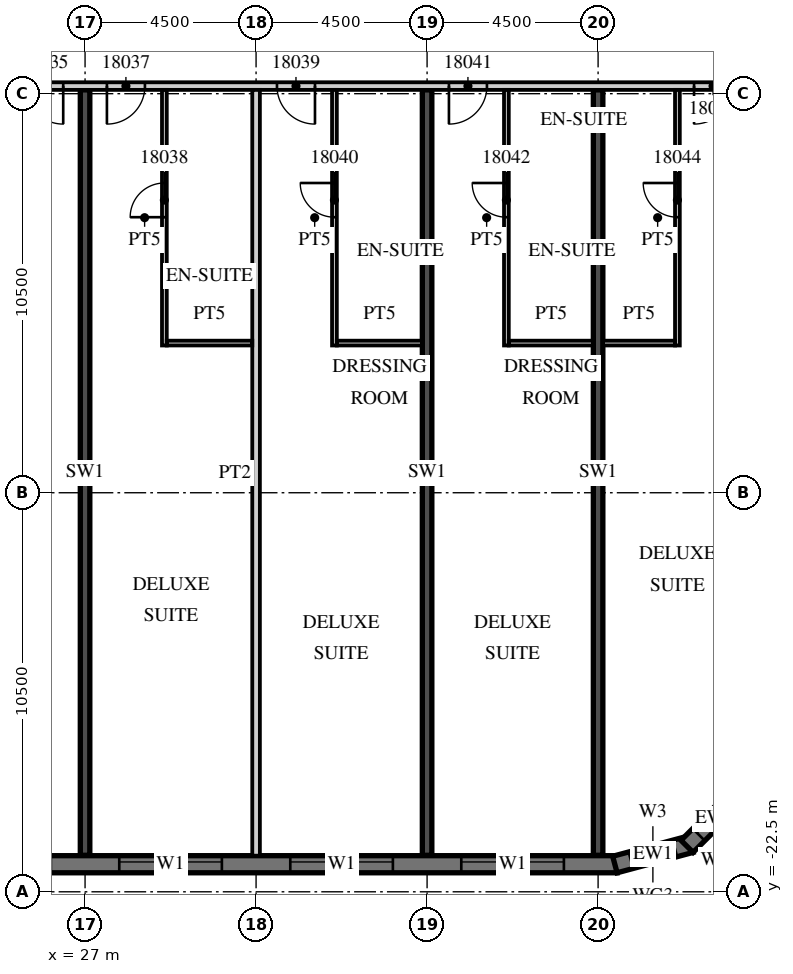
"""IFC4 building model, lengths in metres.
Left out: names, types, materials, properties, quantities, classifications, styles, units other than length and angle.
Written with IfcOpenShell. Run it as: python <this file> out.ifc"""

import sys

from ifc_helpers import new_model, si_unit, direction, frame, frame_2d, origin, place, context, subcontext, project, spatial, polyline, rectangle, outline, extrude, element, fill, save


model = new_model("IFC4")
c1 = context("Model", 3, precision=1e-05, world=origin(), true_north=direction((0.0, 1.0)))
c2 = subcontext(c1, "Body", "Model", "MODEL_VIEW")
j1 = project(units=[si_unit("LENGTHUNIT", "METRE"), si_unit("PLANEANGLEUNIT", "RADIAN")], contexts=[c1])
p1 = place(None, origin())
s1 = spatial("IfcSite", under=j1, at=p1, CompositionType="ELEMENT")
p2 = place(p1, origin())
s2 = spatial("IfcBuilding", under=s1, at=p2, CompositionType="ELEMENT")
p3 = place(p2, frame((0.0, 0.0, 89.7)))
s3 = spatial("IfcBuildingStorey", under=s2, at=p3, CompositionType="ELEMENT", Elevation=89.7)
for number, where, z_axis, x_axis in (
    (1, (27.0, -21.54, 0.0), (0.0, 0.0, 1.0), (0.0, 1.0, 0.0)),
    (2, (36.0, -21.54, 0.0), (0.0, 0.0, 1.0), (0.0, 1.0, 0.0)),
    (3, (40.5, -21.54, 0.0), (0.0, 0.0, 1.0), (0.0, 1.0, 0.0)),
):
    element("IfcWall", number, at=place(p3, frame(where, z_axis=z_axis, x_axis=x_axis)), inside=s3, PredefinedType="SHEAR", context=c2, shape_type="SweptSolid", body=[
        extrude(rectangle(XDim=20.14, YDim=0.25, at=frame_2d((10.07, 0.0))), origin(), (0.0, 0.0, 1.0), 3.3),
    ])
p4 = place(p3, frame((-13.5, -21.775, 0.0), z_axis=(0.0, 0.0, 1.0), x_axis=(1.0, 0.0, 0.0)))
e4 = element("IfcWall", 4, at=p4, inside=s3, PredefinedType="SOLIDWALL", context=c2, shape_type="SweptSolid", body=[
    extrude(rectangle(XDim=54.5, YDim=0.45, at=frame_2d((27.25, 0.0))), origin(), (0.0, 0.0, 1.0), 3.02),
])
p5 = place(p4, frame((0.9, 0.0, 0.45)))
e5 = element("IfcOpeningElement", 5, at=p5, cuts=e4, PredefinedType="OPENING", context=c2, shape_type="SweptSolid", body=[
    extrude(rectangle(XDim=2.7, YDim=2.25, at=frame_2d((1.35, 1.125))), frame((0.0, 0.235, 0.0), z_axis=(0.0, -1.0, 0.0), x_axis=(1.0, 0.0, 0.0)), (0.0, 0.0, 1.0), 0.47),
])
p6 = place(p4, frame((5.4, 0.0, 0.45)))
e6 = element("IfcOpeningElement", 6, at=p6, cuts=e4, PredefinedType="OPENING", context=c2, shape_type="SweptSolid", body=[
    extrude(rectangle(XDim=2.7, YDim=2.25, at=frame_2d((1.35, 1.125))), frame((0.0, 0.235, 0.0), z_axis=(0.0, -1.0, 0.0), x_axis=(1.0, 0.0, 0.0)), (0.0, 0.0, 1.0), 0.47),
])
p7 = place(p4, frame((9.9, 0.0, 0.45)))
e7 = element("IfcOpeningElement", 7, at=p7, cuts=e4, PredefinedType="OPENING", context=c2, shape_type="SweptSolid", body=[
    extrude(rectangle(XDim=2.7, YDim=2.25, at=frame_2d((1.35, 1.125))), frame((0.0, 0.235, 0.0), z_axis=(0.0, -1.0, 0.0), x_axis=(1.0, 0.0, 0.0)), (0.0, 0.0, 1.0), 0.47),
])
p8 = place(p4, frame((14.4, 0.0, 0.45)))
e8 = element("IfcOpeningElement", 8, at=p8, cuts=e4, PredefinedType="OPENING", context=c2, shape_type="SweptSolid", body=[
    extrude(rectangle(XDim=2.7, YDim=2.25, at=frame_2d((1.35, 1.125))), frame((0.0, 0.235, 0.0), z_axis=(0.0, -1.0, 0.0), x_axis=(1.0, 0.0, 0.0)), (0.0, 0.0, 1.0), 0.47),
])
p9 = place(p4, frame((18.9, 0.0, 0.45)))
e9 = element("IfcOpeningElement", 9, at=p9, cuts=e4, PredefinedType="OPENING", context=c2, shape_type="SweptSolid", body=[
    extrude(rectangle(XDim=2.7, YDim=2.25, at=frame_2d((1.35, 1.125))), frame((0.0, 0.235, 0.0), z_axis=(0.0, -1.0, 0.0), x_axis=(1.0, 0.0, 0.0)), (0.0, 0.0, 1.0), 0.47),
])
p10 = place(p4, frame((23.4, 0.0, 0.45)))
e10 = element("IfcOpeningElement", 10, at=p10, cuts=e4, PredefinedType="OPENING", context=c2, shape_type="SweptSolid", body=[
    extrude(rectangle(XDim=2.7, YDim=2.25, at=frame_2d((1.35, 1.125))), frame((0.0, 0.235, 0.0), z_axis=(0.0, -1.0, 0.0), x_axis=(1.0, 0.0, 0.0)), (0.0, 0.0, 1.0), 0.47),
])
p11 = place(p4, frame((27.9, 0.0, 0.45)))
e11 = element("IfcOpeningElement", 11, at=p11, cuts=e4, PredefinedType="OPENING", context=c2, shape_type="SweptSolid", body=[
    extrude(rectangle(XDim=2.7, YDim=2.25, at=frame_2d((1.35, 1.125))), frame((0.0, 0.235, 0.0), z_axis=(0.0, -1.0, 0.0), x_axis=(1.0, 0.0, 0.0)), (0.0, 0.0, 1.0), 0.47),
])
p12 = place(p4, frame((32.4, 0.0, 0.45)))
e12 = element("IfcOpeningElement", 12, at=p12, cuts=e4, PredefinedType="OPENING", context=c2, shape_type="SweptSolid", body=[
    extrude(rectangle(XDim=2.7, YDim=2.25, at=frame_2d((1.35, 1.125))), frame((0.0, 0.235, 0.0), z_axis=(0.0, -1.0, 0.0), x_axis=(1.0, 0.0, 0.0)), (0.0, 0.0, 1.0), 0.47),
])
p13 = place(p4, frame((36.9, 0.0, 0.45)))
e13 = element("IfcOpeningElement", 13, at=p13, cuts=e4, PredefinedType="OPENING", context=c2, shape_type="SweptSolid", body=[
    extrude(rectangle(XDim=2.7, YDim=2.25, at=frame_2d((1.35, 1.125))), frame((0.0, 0.235, 0.0), z_axis=(0.0, -1.0, 0.0), x_axis=(1.0, 0.0, 0.0)), (0.0, 0.0, 1.0), 0.47),
])
p14 = place(p4, frame((41.4, 0.0, 0.45)))
e14 = element("IfcOpeningElement", 14, at=p14, cuts=e4, PredefinedType="OPENING", context=c2, shape_type="SweptSolid", body=[
    extrude(rectangle(XDim=2.7, YDim=2.25, at=frame_2d((1.35, 1.125))), frame((0.0, 0.235, 0.0), z_axis=(0.0, -1.0, 0.0), x_axis=(1.0, 0.0, 0.0)), (0.0, 0.0, 1.0), 0.47),
])
p15 = place(p4, frame((45.9, 0.0, 0.45)))
e15 = element("IfcOpeningElement", 15, at=p15, cuts=e4, PredefinedType="OPENING", context=c2, shape_type="SweptSolid", body=[
    extrude(rectangle(XDim=2.7, YDim=2.25, at=frame_2d((1.35, 1.125))), frame((0.0, 0.235, 0.0), z_axis=(0.0, -1.0, 0.0), x_axis=(1.0, 0.0, 0.0)), (0.0, 0.0, 1.0), 0.47),
])
p16 = place(p4, frame((50.4, 0.0, 0.45)))
e16 = element("IfcOpeningElement", 16, at=p16, cuts=e4, PredefinedType="OPENING", context=c2, shape_type="SweptSolid", body=[
    extrude(rectangle(XDim=2.7, YDim=2.25, at=frame_2d((1.35, 1.125))), frame((0.0, 0.235, 0.0), z_axis=(0.0, -1.0, 0.0), x_axis=(1.0, 0.0, 0.0)), (0.0, 0.0, 1.0), 0.47),
])
p17 = place(p3, frame((40.942, -21.783, 0.0), z_axis=(0.0, 0.0, 1.0), x_axis=(0.965926999034, 0.25881466832, 0.0)))
e17 = element("IfcWall", 17, at=p17, inside=s3, PredefinedType="SOLIDWALL", context=c2, shape_type="SweptSolid", body=[
    extrude(outline(polyline([(0.0, -0.225), (2.071, -0.225), (1.95, 0.225), (0.121, 0.225), (0.0, -0.225)])), origin(), (0.0, 0.0, 1.0), 3.02),
])
p18 = place(p17, frame((0.435, 0.0, 0.45)))
e18 = element("IfcOpeningElement", 18, at=p18, cuts=e17, PredefinedType="OPENING", context=c2, shape_type="SweptSolid", body=[
    extrude(rectangle(XDim=1.2, YDim=2.25, at=frame_2d((0.6, 1.125))), frame((0.0, 0.235, 0.0), z_axis=(0.0, -1.0, 0.0), x_axis=(1.0, 0.0, 0.0)), (0.0, 0.0, 1.0), 0.47),
])
p19 = place(p3, frame((42.841, -21.305, 0.0), z_axis=(0.0, 0.0, 1.0), x_axis=(0.707106781187, 0.707106781187, 0.0)))
e19 = element("IfcWall", 19, at=p19, inside=s3, PredefinedType="SOLIDWALL", context=c2, shape_type="SweptSolid", body=[
    extrude(outline(polyline([(0.0, -0.225), (2.071, -0.225), (1.95, 0.225), (0.121, 0.225), (0.0, -0.225)])), origin(), (0.0, 0.0, 1.0), 3.02),
])
p20 = place(p19, frame((0.435, 0.0, 0.45)))
e20 = element("IfcOpeningElement", 20, at=p20, cuts=e19, PredefinedType="OPENING", context=c2, shape_type="SweptSolid", body=[
    extrude(rectangle(XDim=1.2, YDim=2.25, at=frame_2d((0.6, 1.125))), frame((0.0, 0.235, 0.0), z_axis=(0.0, -1.0, 0.0), x_axis=(1.0, 0.0, 0.0)), (0.0, 0.0, 1.0), 0.47),
])
p21 = place(p3, frame((-13.5, -1.3, 0.0), z_axis=(0.0, 0.0, 1.0), x_axis=(1.0, 0.0, 0.0)))
e21 = element("IfcWall", 21, at=p21, inside=s3, PredefinedType="PARTITIONING", context=c2, shape_type="SweptSolid", body=[
    extrude(rectangle(XDim=58.05, YDim=0.2, at=frame_2d((29.025, 0.0))), origin(), (0.0, 0.0, 1.0), 3.02),
])
p22 = place(p21, frame((2.925, 0.0, 0.0)))
e22 = element("IfcOpeningElement", 22, at=p22, cuts=e21, PredefinedType="OPENING", context=c2, shape_type="SweptSolid", body=[
    extrude(rectangle(XDim=1.0, YDim=2.1, at=frame_2d((0.5, 1.05))), frame((0.0, 0.11, 0.0), z_axis=(0.0, -1.0, 0.0), x_axis=(1.0, 0.0, 0.0)), (0.0, 0.0, 1.0), 0.22),
])
p23 = place(p21, frame((5.075, 0.0, 0.0)))
e23 = element("IfcOpeningElement", 23, at=p23, cuts=e21, PredefinedType="OPENING", context=c2, shape_type="SweptSolid", body=[
    extrude(rectangle(XDim=1.0, YDim=2.1, at=frame_2d((0.5, 1.05))), frame((0.0, 0.11, 0.0), z_axis=(0.0, -1.0, 0.0), x_axis=(1.0, 0.0, 0.0)), (0.0, 0.0, 1.0), 0.22),
])
p24 = place(p21, frame((9.55, 0.0, 0.0)))
e24 = element("IfcOpeningElement", 24, at=p24, cuts=e21, PredefinedType="OPENING", context=c2, shape_type="SweptSolid", body=[
    extrude(rectangle(XDim=1.0, YDim=2.1, at=frame_2d((0.5, 1.05))), frame((0.0, 0.11, 0.0), z_axis=(0.0, -1.0, 0.0), x_axis=(1.0, 0.0, 0.0)), (0.0, 0.0, 1.0), 0.22),
])
p25 = place(p21, frame((14.075, 0.0, 0.0)))
e25 = element("IfcOpeningElement", 25, at=p25, cuts=e21, PredefinedType="OPENING", context=c2, shape_type="SweptSolid", body=[
    extrude(rectangle(XDim=1.0, YDim=2.1, at=frame_2d((0.5, 1.05))), frame((0.0, 0.11, 0.0), z_axis=(0.0, -1.0, 0.0), x_axis=(1.0, 0.0, 0.0)), (0.0, 0.0, 1.0), 0.22),
])
p26 = place(p21, frame((20.925, 0.0, 0.0)))
e26 = element("IfcOpeningElement", 26, at=p26, cuts=e21, PredefinedType="OPENING", context=c2, shape_type="SweptSolid", body=[
    extrude(rectangle(XDim=1.0, YDim=2.1, at=frame_2d((0.5, 1.05))), frame((0.0, 0.11, 0.0), z_axis=(0.0, -1.0, 0.0), x_axis=(1.0, 0.0, 0.0)), (0.0, 0.0, 1.0), 0.22),
])
p27 = place(p21, frame((27.862, 0.0, 0.0)))
e27 = element("IfcOpeningElement", 27, at=p27, cuts=e21, PredefinedType="OPENING", context=c2, shape_type="SweptSolid", body=[
    extrude(rectangle(XDim=1.2, YDim=2.1, at=frame_2d((0.6, 1.05))), frame((0.0, 0.11, 0.0), z_axis=(0.0, -1.0, 0.0), x_axis=(1.0, 0.0, 0.0)), (0.0, 0.0, 1.0), 0.22),
])
p28 = place(p21, frame((34.45, 0.0, 0.0)))
e28 = element("IfcOpeningElement", 28, at=p28, cuts=e21, PredefinedType="OPENING", context=c2, shape_type="SweptSolid", body=[
    extrude(rectangle(XDim=1.0, YDim=2.1, at=frame_2d((0.5, 1.05))), frame((0.0, 0.11, 0.0), z_axis=(0.0, -1.0, 0.0), x_axis=(1.0, 0.0, 0.0)), (0.0, 0.0, 1.0), 0.22),
])
p29 = place(p21, frame((38.925, 0.0, 0.0)))
e29 = element("IfcOpeningElement", 29, at=p29, cuts=e21, PredefinedType="OPENING", context=c2, shape_type="SweptSolid", body=[
    extrude(rectangle(XDim=1.0, YDim=2.1, at=frame_2d((0.5, 1.05))), frame((0.0, 0.11, 0.0), z_axis=(0.0, -1.0, 0.0), x_axis=(1.0, 0.0, 0.0)), (0.0, 0.0, 1.0), 0.22),
])
p30 = place(p21, frame((41.075, 0.0, 0.0)))
e30 = element("IfcOpeningElement", 30, at=p30, cuts=e21, PredefinedType="OPENING", context=c2, shape_type="SweptSolid", body=[
    extrude(rectangle(XDim=1.0, YDim=2.1, at=frame_2d((0.5, 1.05))), frame((0.0, 0.11, 0.0), z_axis=(0.0, -1.0, 0.0), x_axis=(1.0, 0.0, 0.0)), (0.0, 0.0, 1.0), 0.22),
])
p31 = place(p21, frame((45.55, 0.0, 0.0)))
e31 = element("IfcOpeningElement", 31, at=p31, cuts=e21, PredefinedType="OPENING", context=c2, shape_type="SweptSolid", body=[
    extrude(rectangle(XDim=1.0, YDim=2.1, at=frame_2d((0.5, 1.05))), frame((0.0, 0.11, 0.0), z_axis=(0.0, -1.0, 0.0), x_axis=(1.0, 0.0, 0.0)), (0.0, 0.0, 1.0), 0.22),
])
p32 = place(p21, frame((50.075, 0.0, 0.0)))
e32 = element("IfcOpeningElement", 32, at=p32, cuts=e21, PredefinedType="OPENING", context=c2, shape_type="SweptSolid", body=[
    extrude(rectangle(XDim=1.0, YDim=2.1, at=frame_2d((0.5, 1.05))), frame((0.0, 0.11, 0.0), z_axis=(0.0, -1.0, 0.0), x_axis=(1.0, 0.0, 0.0)), (0.0, 0.0, 1.0), 0.22),
])
p33 = place(p21, frame((56.525, 0.0, 0.0)))
e33 = element("IfcOpeningElement", 33, at=p33, cuts=e21, PredefinedType="OPENING", context=c2, shape_type="SweptSolid", body=[
    extrude(rectangle(XDim=1.0, YDim=2.1, at=frame_2d((0.5, 1.05))), frame((0.0, 0.11, 0.0), z_axis=(0.0, -1.0, 0.0), x_axis=(1.0, 0.0, 0.0)), (0.0, 0.0, 1.0), 0.22),
])
p34 = place(p3, frame((31.5, -21.55, 0.0), z_axis=(0.0, 0.0, 1.0), x_axis=(0.0, 1.0, 0.0)))
e34 = element("IfcWall", 34, at=p34, inside=s3, PredefinedType="PARTITIONING", context=c2, shape_type="SweptSolid", body=[
    extrude(rectangle(XDim=20.15, YDim=0.2, at=frame_2d((10.075, 0.0))), origin(), (0.0, 0.0, 1.0), 3.02),
])
p35 = place(p3, frame((29.087, -8.125, 0.0), z_axis=(0.0, 0.0, 1.0), x_axis=(0.0, 1.0, 0.0)))
e35 = element("IfcWall", 35, at=p35, inside=s3, PredefinedType="PARTITIONING", context=c2, shape_type="SweptSolid", body=[
    extrude(rectangle(XDim=6.725, YDim=0.125, at=frame_2d((3.363, 0.0))), origin(), (0.0, 0.0, 1.0), 3.02),
])
p36 = place(p35, frame((3.375, 0.0, 0.0)))
e36 = element("IfcOpeningElement", 36, at=p36, cuts=e35, PredefinedType="OPENING", context=c2, shape_type="SweptSolid", body=[
    extrude(rectangle(XDim=0.9, YDim=2.1, at=frame_2d((0.45, 1.05))), frame((0.0, 0.073, 0.0), z_axis=(0.0, -1.0, 0.0), x_axis=(1.0, 0.0, 0.0)), (0.0, 0.0, 1.0), 0.145),
])
p37 = place(p3, frame((29.15, -8.062, 0.0), z_axis=(0.0, 0.0, 1.0), x_axis=(1.0, 0.0, 0.0)))
e37 = element("IfcWall", 37, at=p37, inside=s3, PredefinedType="PARTITIONING", context=c2, shape_type="SweptSolid", body=[
    extrude(rectangle(XDim=2.25, YDim=0.125, at=frame_2d((1.125, 0.0))), origin(), (0.0, 0.0, 1.0), 3.02),
])
p38 = place(p3, frame((33.562, -8.125, 0.0), z_axis=(0.0, 0.0, 1.0), x_axis=(0.0, 1.0, 0.0)))
e38 = element("IfcWall", 38, at=p38, inside=s3, PredefinedType="PARTITIONING", context=c2, shape_type="SweptSolid", body=[
    extrude(rectangle(XDim=6.725, YDim=0.125, at=frame_2d((3.363, 0.0))), origin(), (0.0, 0.0, 1.0), 3.02),
])
p39 = place(p38, frame((3.375, 0.0, 0.0)))
e39 = element("IfcOpeningElement", 39, at=p39, cuts=e38, PredefinedType="OPENING", context=c2, shape_type="SweptSolid", body=[
    extrude(rectangle(XDim=0.9, YDim=2.1, at=frame_2d((0.45, 1.05))), frame((0.0, 0.073, 0.0), z_axis=(0.0, -1.0, 0.0), x_axis=(1.0, 0.0, 0.0)), (0.0, 0.0, 1.0), 0.145),
])
p40 = place(p3, frame((33.625, -8.062, 0.0), z_axis=(0.0, 0.0, 1.0), x_axis=(1.0, 0.0, 0.0)))
e40 = element("IfcWall", 40, at=p40, inside=s3, PredefinedType="PARTITIONING", context=c2, shape_type="SweptSolid", body=[
    extrude(rectangle(XDim=2.25, YDim=0.125, at=frame_2d((1.125, 0.0))), origin(), (0.0, 0.0, 1.0), 3.02),
])
p41 = place(p3, frame((38.087, -8.125, 0.0), z_axis=(0.0, 0.0, 1.0), x_axis=(0.0, 1.0, 0.0)))
e41 = element("IfcWall", 41, at=p41, inside=s3, PredefinedType="PARTITIONING", context=c2, shape_type="SweptSolid", body=[
    extrude(rectangle(XDim=6.725, YDim=0.125, at=frame_2d((3.363, 0.0))), origin(), (0.0, 0.0, 1.0), 3.02),
])
p42 = place(p41, frame((3.375, 0.0, 0.0)))
e42 = element("IfcOpeningElement", 42, at=p42, cuts=e41, PredefinedType="OPENING", context=c2, shape_type="SweptSolid", body=[
    extrude(rectangle(XDim=0.9, YDim=2.1, at=frame_2d((0.45, 1.05))), frame((0.0, 0.073, 0.0), z_axis=(0.0, -1.0, 0.0), x_axis=(1.0, 0.0, 0.0)), (0.0, 0.0, 1.0), 0.145),
])
p43 = place(p3, frame((38.15, -8.062, 0.0), z_axis=(0.0, 0.0, 1.0), x_axis=(1.0, 0.0, 0.0)))
e43 = element("IfcWall", 43, at=p43, inside=s3, PredefinedType="PARTITIONING", context=c2, shape_type="SweptSolid", body=[
    extrude(rectangle(XDim=2.225, YDim=0.125, at=frame_2d((1.113, 0.0))), origin(), (0.0, 0.0, 1.0), 3.02),
])
p44 = place(p3, frame((42.587, -8.125, 0.0), z_axis=(0.0, 0.0, 1.0), x_axis=(0.0, 1.0, 0.0)))
e44 = element("IfcWall", 44, at=p44, inside=s3, PredefinedType="PARTITIONING", context=c2, shape_type="SweptSolid", body=[
    extrude(rectangle(XDim=6.725, YDim=0.125, at=frame_2d((3.363, 0.0))), origin(), (0.0, 0.0, 1.0), 3.02),
])
p45 = place(p44, frame((3.375, 0.0, 0.0)))
e45 = element("IfcOpeningElement", 45, at=p45, cuts=e44, PredefinedType="OPENING", context=c2, shape_type="SweptSolid", body=[
    extrude(rectangle(XDim=0.9, YDim=2.1, at=frame_2d((0.45, 1.05))), frame((0.0, 0.073, 0.0), z_axis=(0.0, -1.0, 0.0), x_axis=(1.0, 0.0, 0.0)), (0.0, 0.0, 1.0), 0.145),
])
p46 = place(p3, frame((40.625, -8.062, 0.0), z_axis=(0.0, 0.0, 1.0), x_axis=(1.0, 0.0, 0.0)))
e46 = element("IfcWall", 46, at=p46, inside=s3, PredefinedType="PARTITIONING", context=c2, shape_type="SweptSolid", body=[
    extrude(rectangle(XDim=1.9, YDim=0.125, at=frame_2d((0.95, 0.0))), origin(), (0.0, 0.0, 1.0), 3.02),
])
p47 = place(p14, origin())
e47 = element("IfcWindow", 47, at=p47, inside=s3, PartitioningType="SINGLE_PANEL", PredefinedType="WINDOW", context=c2, shape_type="SweptSolid", body=[
    extrude(rectangle(XDim=2.7, YDim=2.25, at=frame_2d((1.35, 1.125))), frame((0.0, 0.09, 0.0), z_axis=(0.0, -1.0, 0.0), x_axis=(1.0, 0.0, 0.0)), (0.0, 0.0, 1.0), 0.06),
])
fill(e14, e47)
p48 = place(p15, origin())
e48 = element("IfcWindow", 48, at=p48, inside=s3, PartitioningType="SINGLE_PANEL", PredefinedType="WINDOW", context=c2, shape_type="SweptSolid", body=[
    extrude(rectangle(XDim=2.7, YDim=2.25, at=frame_2d((1.35, 1.125))), frame((0.0, 0.09, 0.0), z_axis=(0.0, -1.0, 0.0), x_axis=(1.0, 0.0, 0.0)), (0.0, 0.0, 1.0), 0.06),
])
fill(e15, e48)
p49 = place(p16, origin())
e49 = element("IfcWindow", 49, at=p49, inside=s3, PartitioningType="SINGLE_PANEL", PredefinedType="WINDOW", context=c2, shape_type="SweptSolid", body=[
    extrude(rectangle(XDim=2.7, YDim=2.25, at=frame_2d((1.35, 1.125))), frame((0.0, 0.09, 0.0), z_axis=(0.0, -1.0, 0.0), x_axis=(1.0, 0.0, 0.0)), (0.0, 0.0, 1.0), 0.06),
])
fill(e16, e49)
p50 = place(p18, origin())
e50 = element("IfcWindow", 50, at=p50, inside=s3, PartitioningType="SINGLE_PANEL", PredefinedType="WINDOW", context=c2, shape_type="SweptSolid", body=[
    extrude(rectangle(XDim=1.2, YDim=2.25, at=frame_2d((0.6, 1.125))), frame((0.0, 0.09, 0.0), z_axis=(0.0, -1.0, 0.0), x_axis=(1.0, 0.0, 0.0)), (0.0, 0.0, 1.0), 0.06),
])
fill(e18, e50)
p51 = place(p20, origin())
e51 = element("IfcWindow", 51, at=p51, inside=s3, PartitioningType="SINGLE_PANEL", PredefinedType="WINDOW", context=c2, shape_type="SweptSolid", body=[
    extrude(rectangle(XDim=1.2, YDim=2.25, at=frame_2d((0.6, 1.125))), frame((0.0, 0.09, 0.0), z_axis=(0.0, -1.0, 0.0), x_axis=(1.0, 0.0, 0.0)), (0.0, 0.0, 1.0), 0.06),
])
fill(e20, e51)
p52 = place(p29, origin())
e52 = element("IfcDoor", 52, at=p52, inside=s3, OperationType="SINGLE_SWING_RIGHT", PredefinedType="DOOR", context=c2, shape_type="SweptSolid", body=[
    extrude(rectangle(XDim=1.0, YDim=2.1, at=frame_2d((0.5, 1.05))), frame((0.0, 0.025, 0.0), z_axis=(0.0, -1.0, 0.0), x_axis=(1.0, 0.0, 0.0)), (0.0, 0.0, 1.0), 0.05),
])
fill(e29, e52)
p53 = place(p30, origin())
e53 = element("IfcDoor", 53, at=p53, inside=s3, OperationType="SINGLE_SWING_LEFT", PredefinedType="DOOR", context=c2, shape_type="SweptSolid", body=[
    extrude(rectangle(XDim=1.0, YDim=2.1, at=frame_2d((0.5, 1.05))), frame((0.0, 0.025, 0.0), z_axis=(0.0, -1.0, 0.0), x_axis=(1.0, 0.0, 0.0)), (0.0, 0.0, 1.0), 0.05),
])
fill(e30, e53)
p54 = place(p36, origin())
e54 = element("IfcDoor", 54, at=p54, inside=s3, OperationType="SINGLE_SWING_LEFT", PredefinedType="DOOR", context=c2, shape_type="SweptSolid", body=[
    extrude(rectangle(XDim=0.9, YDim=2.1, at=frame_2d((0.45, 1.05))), frame((0.0, 0.025, 0.0), z_axis=(0.0, -1.0, 0.0), x_axis=(1.0, 0.0, 0.0)), (0.0, 0.0, 1.0), 0.05),
])
fill(e36, e54)
p55 = place(p31, origin())
e55 = element("IfcDoor", 55, at=p55, inside=s3, OperationType="SINGLE_SWING_RIGHT", PredefinedType="DOOR", context=c2, shape_type="SweptSolid", body=[
    extrude(rectangle(XDim=1.0, YDim=2.1, at=frame_2d((0.5, 1.05))), frame((0.0, 0.025, 0.0), z_axis=(0.0, -1.0, 0.0), x_axis=(1.0, 0.0, 0.0)), (0.0, 0.0, 1.0), 0.05),
])
fill(e31, e55)
p56 = place(p39, origin())
e56 = element("IfcDoor", 56, at=p56, inside=s3, OperationType="SINGLE_SWING_RIGHT", PredefinedType="DOOR", context=c2, shape_type="SweptSolid", body=[
    extrude(rectangle(XDim=0.9, YDim=2.1, at=frame_2d((0.45, 1.05))), frame((0.0, 0.025, 0.0), z_axis=(0.0, -1.0, 0.0), x_axis=(1.0, 0.0, 0.0)), (0.0, 0.0, 1.0), 0.05),
])
fill(e39, e56)
p57 = place(p32, origin())
e57 = element("IfcDoor", 57, at=p57, inside=s3, OperationType="SINGLE_SWING_LEFT", PredefinedType="DOOR", context=c2, shape_type="SweptSolid", body=[
    extrude(rectangle(XDim=1.0, YDim=2.1, at=frame_2d((0.5, 1.05))), frame((0.0, 0.025, 0.0), z_axis=(0.0, -1.0, 0.0), x_axis=(1.0, 0.0, 0.0)), (0.0, 0.0, 1.0), 0.05),
])
fill(e32, e57)
p58 = place(p42, origin())
e58 = element("IfcDoor", 58, at=p58, inside=s3, OperationType="SINGLE_SWING_RIGHT", PredefinedType="DOOR", context=c2, shape_type="SweptSolid", body=[
    extrude(rectangle(XDim=0.9, YDim=2.1, at=frame_2d((0.45, 1.05))), frame((0.0, 0.025, 0.0), z_axis=(0.0, -1.0, 0.0), x_axis=(1.0, 0.0, 0.0)), (0.0, 0.0, 1.0), 0.05),
])
fill(e42, e58)
p59 = place(p33, origin())
e59 = element("IfcDoor", 59, at=p59, inside=s3, OperationType="SINGLE_SWING_LEFT", PredefinedType="DOOR", context=c2, shape_type="SweptSolid", body=[
    extrude(rectangle(XDim=1.0, YDim=2.1, at=frame_2d((0.5, 1.05))), frame((0.0, 0.025, 0.0), z_axis=(0.0, -1.0, 0.0), x_axis=(1.0, 0.0, 0.0)), (0.0, 0.0, 1.0), 0.05),
])
fill(e33, e59)
p60 = place(p45, origin())
e60 = element("IfcDoor", 60, at=p60, inside=s3, OperationType="SINGLE_SWING_RIGHT", PredefinedType="DOOR", context=c2, shape_type="SweptSolid", body=[
    extrude(rectangle(XDim=0.9, YDim=2.1, at=frame_2d((0.45, 1.05))), frame((0.0, 0.025, 0.0), z_axis=(0.0, -1.0, 0.0), x_axis=(1.0, 0.0, 0.0)), (0.0, 0.0, 1.0), 0.05),
])
fill(e45, e60)
save(model, sys.argv[1])
